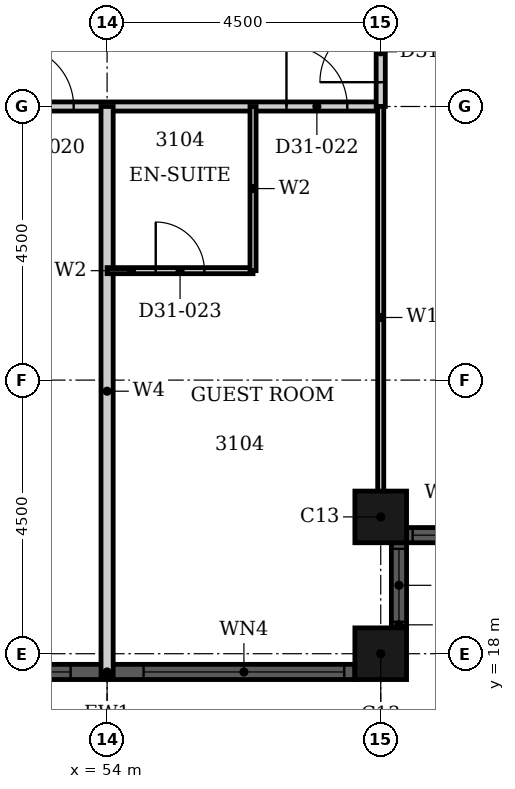
"""IFC4 building model, lengths in metres.
Left out: names, types, materials, properties, quantities, classifications, styles, units other than length and angle.
Written with IfcOpenShell. Run it as: python <this file> out.ifc"""

import sys

from ifc_helpers import new_model, si_unit, direction, frame, frame_2d, origin, origin_2d, place, context, subcontext, project, spatial, rectangle, hollow_rectangle, extrude, element, fill, save


model = new_model("IFC4")
c1 = context("Model", 3, precision=1e-05, world=origin(), true_north=direction((0.0, 1.0)))
c2 = subcontext(c1, "Body", "Model", "MODEL_VIEW")
j1 = project(units=[si_unit("LENGTHUNIT", "METRE"), si_unit("PLANEANGLEUNIT", "RADIAN")], contexts=[c1])
p1 = place(None, origin())
s1 = spatial("IfcSite", under=j1, at=p1, CompositionType="ELEMENT")
p2 = place(p1, origin())
s2 = spatial("IfcBuilding", under=s1, at=p2, CompositionType="ELEMENT")
p3 = place(p2, frame((0.0, 0.0, 126.0)))
s3 = spatial("IfcBuildingStorey", under=s2, at=p3, CompositionType="ELEMENT", Elevation=126.0)
for number, where, z_axis, x_axis in (
    (1, (58.5, 18.0, 0.0), (0.0, 0.0, 1.0), (1.0, 0.0, 0.0)),
    (2, (58.5, 20.25, 0.0), (0.0, 0.0, 1.0), (1.0, 0.0, 0.0)),
):
    element("IfcColumn", number, at=place(p3, frame(where, z_axis=z_axis, x_axis=x_axis)), inside=s3, PredefinedType="COLUMN", context=c2, shape_type="SweptSolid", body=[
        extrude(hollow_rectangle(XDim=0.85, YDim=0.85, WallThickness=0.026, at=origin_2d()), origin(), (0.0, 0.0, 1.0), 3.6),
    ])
p4 = place(p3, frame((49.925, 17.7, 0.0), z_axis=(0.0, 0.0, 1.0), x_axis=(1.0, 0.0, 0.0)))
e3 = element("IfcWall", 3, at=p4, inside=s3, PredefinedType="SOLIDWALL", context=c2, shape_type="SweptSolid", body=[
    extrude(rectangle(XDim=8.15, YDim=0.25, at=frame_2d((4.075, 0.0))), origin(), (0.0, 0.0, 1.0), 3.6),
])
p5 = place(p4, frame((0.175, 0.0, 0.9)))
e4 = element("IfcOpeningElement", 4, at=p5, cuts=e3, PredefinedType="OPENING", context=c2, shape_type="SweptSolid", body=[
    extrude(rectangle(XDim=3.3, YDim=2.08, at=frame_2d((1.65, 1.04))), frame((0.0, 0.135, 0.0), z_axis=(0.0, -1.0, 0.0), x_axis=(1.0, 0.0, 0.0)), (0.0, 0.0, 1.0), 0.27),
])
p6 = place(p4, frame((4.675, 0.0, 0.9)))
e5 = element("IfcOpeningElement", 5, at=p6, cuts=e3, PredefinedType="OPENING", context=c2, shape_type="SweptSolid", body=[
    extrude(rectangle(XDim=3.3, YDim=2.08, at=frame_2d((1.65, 1.04))), frame((0.0, 0.135, 0.0), z_axis=(0.0, -1.0, 0.0), x_axis=(1.0, 0.0, 0.0)), (0.0, 0.0, 1.0), 0.27),
])
p7 = place(p3, frame((58.8, 18.425, 0.0), z_axis=(0.0, 0.0, 1.0), x_axis=(0.0, 1.0, 0.0)))
e6 = element("IfcWall", 6, at=p7, inside=s3, PredefinedType="SOLIDWALL", context=c2, shape_type="SweptSolid", body=[
    extrude(rectangle(XDim=1.4, YDim=0.25, at=frame_2d((0.7, 0.0))), origin(), (0.0, 0.0, 1.0), 3.6),
])
p8 = place(p7, frame((0.1, 0.0, 0.9)))
e7 = element("IfcOpeningElement", 7, at=p8, cuts=e6, PredefinedType="OPENING", context=c2, shape_type="SweptSolid", body=[
    extrude(rectangle(XDim=1.2, YDim=2.08, at=frame_2d((0.6, 1.04))), frame((0.0, 0.135, 0.0), z_axis=(0.0, -1.0, 0.0), x_axis=(1.0, 0.0, 0.0)), (0.0, 0.0, 1.0), 0.27),
])
p9 = place(p3, frame((58.925, 19.95, 0.0), z_axis=(0.0, 0.0, 1.0), x_axis=(1.0, 0.0, 0.0)))
e8 = element("IfcWall", 8, at=p9, inside=s3, PredefinedType="SOLIDWALL", context=c2, shape_type="SweptSolid", body=[
    extrude(rectangle(XDim=1.4, YDim=0.25, at=frame_2d((0.7, 0.0))), origin(), (0.0, 0.0, 1.0), 3.6),
])
p10 = place(p9, frame((0.1, 0.0, 0.9)))
e9 = element("IfcOpeningElement", 9, at=p10, cuts=e8, PredefinedType="OPENING", context=c2, shape_type="SweptSolid", body=[
    extrude(rectangle(XDim=1.2, YDim=2.08, at=frame_2d((0.6, 1.04))), frame((0.0, 0.135, 0.0), z_axis=(0.0, -1.0, 0.0), x_axis=(1.0, 0.0, 0.0)), (0.0, 0.0, 1.0), 0.27),
])
p11 = place(p3, frame((46.8, 27.0, 0.0), z_axis=(0.0, 0.0, 1.0), x_axis=(1.0, 0.0, 0.0)))
e10 = element("IfcWall", 10, at=p11, inside=s3, PredefinedType="PARTITIONING", context=c2, shape_type="SweptSolid", body=[
    extrude(rectangle(XDim=11.7, YDim=0.15, at=frame_2d((5.85, 0.0))), origin(), (0.0, 0.0, 1.0), 2.58),
])
p12 = place(p11, frame((5.65, 0.0, 0.0)))
e11 = element("IfcOpeningElement", 11, at=p12, cuts=e10, PredefinedType="OPENING", context=c2, shape_type="SweptSolid", body=[
    extrude(rectangle(XDim=1.0, YDim=2.1, at=frame_2d((0.5, 1.05))), frame((0.0, 0.085, 0.0), z_axis=(0.0, -1.0, 0.0), x_axis=(1.0, 0.0, 0.0)), (0.0, 0.0, 1.0), 0.17),
])
p13 = place(p11, frame((10.15, 0.0, 0.0)))
e12 = element("IfcOpeningElement", 12, at=p13, cuts=e10, PredefinedType="OPENING", context=c2, shape_type="SweptSolid", body=[
    extrude(rectangle(XDim=1.0, YDim=2.1, at=frame_2d((0.5, 1.05))), frame((0.0, 0.085, 0.0), z_axis=(0.0, -1.0, 0.0), x_axis=(1.0, 0.0, 0.0)), (0.0, 0.0, 1.0), 0.17),
])
p14 = place(p3, frame((58.5, 27.0, 0.0), z_axis=(0.0, 0.0, 1.0), x_axis=(0.0, 1.0, 0.0)))
e13 = element("IfcWall", 13, at=p14, inside=s3, PredefinedType="PARTITIONING", context=c2, shape_type="SweptSolid", body=[
    extrude(rectangle(XDim=1.8, YDim=0.15, at=frame_2d((0.9, 0.0))), origin(), (0.0, 0.0, 1.0), 3.3),
])
p15 = place(p14, frame((0.4, 0.0, 0.0)))
e14 = element("IfcOpeningElement", 14, at=p15, cuts=e13, PredefinedType="OPENING", context=c2, shape_type="SweptSolid", body=[
    extrude(rectangle(XDim=1.0, YDim=2.1, at=frame_2d((0.5, 1.05))), frame((0.0, 0.085, 0.0), z_axis=(0.0, -1.0, 0.0), x_axis=(1.0, 0.0, 0.0)), (0.0, 0.0, 1.0), 0.17),
])
p16 = place(p3, frame((58.5, 20.06, 0.0), z_axis=(0.0, 0.0, 1.0), x_axis=(0.0, 1.0, 0.0)))
e15 = element("IfcWall", 15, at=p16, inside=s3, PredefinedType="PARTITIONING", context=c2, shape_type="SweptSolid", body=[
    extrude(rectangle(XDim=6.94, YDim=0.1, at=frame_2d((3.47, 0.0))), origin(), (0.0, 0.0, 1.0), 3.3),
])
p17 = place(p3, frame((54.0, 17.635, 0.0), z_axis=(0.0, 0.0, 1.0), x_axis=(0.0, 1.0, 0.0)))
e16 = element("IfcWall", 16, at=p17, inside=s3, PredefinedType="PARTITIONING", context=c2, shape_type="SweptSolid", body=[
    extrude(rectangle(XDim=9.365, YDim=0.2, at=frame_2d((4.683, 0.0))), origin(), (0.0, 0.0, 1.0), 3.3),
])
p18 = place(p3, frame((54.0, 24.3, 0.0), z_axis=(0.0, 0.0, 1.0), x_axis=(1.0, 0.0, 0.0)))
e17 = element("IfcWall", 17, at=p18, inside=s3, PredefinedType="PARTITIONING", context=c2, shape_type="SweptSolid", body=[
    extrude(rectangle(XDim=2.4, YDim=0.1, at=frame_2d((1.2, 0.0))), origin(), (0.0, 0.0, 1.0), 3.3),
])
p19 = place(p18, frame((0.8, 0.0, 0.0)))
e18 = element("IfcOpeningElement", 18, at=p19, cuts=e17, PredefinedType="OPENING", context=c2, shape_type="SweptSolid", body=[
    extrude(rectangle(XDim=0.8, YDim=2.1, at=frame_2d((0.4, 1.05))), frame((0.0, 0.06, 0.0), z_axis=(0.0, -1.0, 0.0), x_axis=(1.0, 0.0, 0.0)), (0.0, 0.0, 1.0), 0.12),
])
p20 = place(p3, frame((56.4, 24.3, 0.0), z_axis=(0.0, 0.0, 1.0), x_axis=(0.0, 1.0, 0.0)))
e19 = element("IfcWall", 19, at=p20, inside=s3, PredefinedType="PARTITIONING", context=c2, shape_type="SweptSolid", body=[
    extrude(rectangle(XDim=2.7, YDim=0.1, at=frame_2d((1.35, 0.0))), origin(), (0.0, 0.0, 1.0), 3.3),
])
p21 = place(p5, origin())
e20 = element("IfcWindow", 20, at=p21, inside=s3, PartitioningType="SINGLE_PANEL", PredefinedType="WINDOW", context=c2, shape_type="SweptSolid", body=[
    extrude(rectangle(XDim=3.3, YDim=2.08, at=frame_2d((1.65, 1.04))), frame((0.0, 0.03, 0.0), z_axis=(0.0, -1.0, 0.0), x_axis=(1.0, 0.0, 0.0)), (0.0, 0.0, 1.0), 0.06),
])
fill(e4, e20)
p22 = place(p6, origin())
e21 = element("IfcWindow", 21, at=p22, inside=s3, PartitioningType="SINGLE_PANEL", PredefinedType="WINDOW", context=c2, shape_type="SweptSolid", body=[
    extrude(rectangle(XDim=3.3, YDim=2.08, at=frame_2d((1.65, 1.04))), frame((0.0, 0.03, 0.0), z_axis=(0.0, -1.0, 0.0), x_axis=(1.0, 0.0, 0.0)), (0.0, 0.0, 1.0), 0.06),
])
fill(e5, e21)
p23 = place(p8, origin())
e22 = element("IfcWindow", 22, at=p23, inside=s3, PartitioningType="SINGLE_PANEL", PredefinedType="WINDOW", context=c2, shape_type="SweptSolid", body=[
    extrude(rectangle(XDim=1.2, YDim=2.08, at=frame_2d((0.6, 1.04))), frame((0.0, 0.03, 0.0), z_axis=(0.0, -1.0, 0.0), x_axis=(1.0, 0.0, 0.0)), (0.0, 0.0, 1.0), 0.06),
])
fill(e7, e22)
p24 = place(p10, origin())
e23 = element("IfcWindow", 23, at=p24, inside=s3, PartitioningType="SINGLE_PANEL", PredefinedType="WINDOW", context=c2, shape_type="SweptSolid", body=[
    extrude(rectangle(XDim=1.2, YDim=2.08, at=frame_2d((0.6, 1.04))), frame((0.0, 0.03, 0.0), z_axis=(0.0, -1.0, 0.0), x_axis=(1.0, 0.0, 0.0)), (0.0, 0.0, 1.0), 0.06),
])
fill(e9, e23)
p25 = place(p12, origin())
e24 = element("IfcDoor", 24, at=p25, inside=s3, OperationType="SINGLE_SWING_RIGHT", PredefinedType="DOOR", context=c2, shape_type="SweptSolid", body=[
    extrude(rectangle(XDim=1.0, YDim=2.1, at=frame_2d((0.5, 1.05))), frame((0.0, 0.025, 0.0), z_axis=(0.0, -1.0, 0.0), x_axis=(1.0, 0.0, 0.0)), (0.0, 0.0, 1.0), 0.05),
])
fill(e11, e24)
p26 = place(p13, origin())
e25 = element("IfcDoor", 25, at=p26, inside=s3, OperationType="SINGLE_SWING_RIGHT", PredefinedType="DOOR", context=c2, shape_type="SweptSolid", body=[
    extrude(rectangle(XDim=1.0, YDim=2.1, at=frame_2d((0.5, 1.05))), frame((0.0, 0.025, 0.0), z_axis=(0.0, -1.0, 0.0), x_axis=(1.0, 0.0, 0.0)), (0.0, 0.0, 1.0), 0.05),
])
fill(e12, e25)
p27 = place(p19, origin())
e26 = element("IfcDoor", 26, at=p27, inside=s3, OperationType="SINGLE_SWING_LEFT", PredefinedType="DOOR", context=c2, shape_type="SweptSolid", body=[
    extrude(rectangle(XDim=0.8, YDim=2.1, at=frame_2d((0.4, 1.05))), frame((0.0, 0.025, 0.0), z_axis=(0.0, -1.0, 0.0), x_axis=(1.0, 0.0, 0.0)), (0.0, 0.0, 1.0), 0.05),
])
fill(e18, e26)
p28 = place(p15, origin())
e27 = element("IfcDoor", 27, at=p28, inside=s3, OperationType="SINGLE_SWING_RIGHT", PredefinedType="DOOR", context=c2, shape_type="SweptSolid", body=[
    extrude(rectangle(XDim=1.0, YDim=2.1, at=frame_2d((0.5, 1.05))), frame((0.0, 0.025, 0.0), z_axis=(0.0, -1.0, 0.0), x_axis=(1.0, 0.0, 0.0)), (0.0, 0.0, 1.0), 0.05),
])
fill(e14, e27)
save(model, sys.argv[1])
